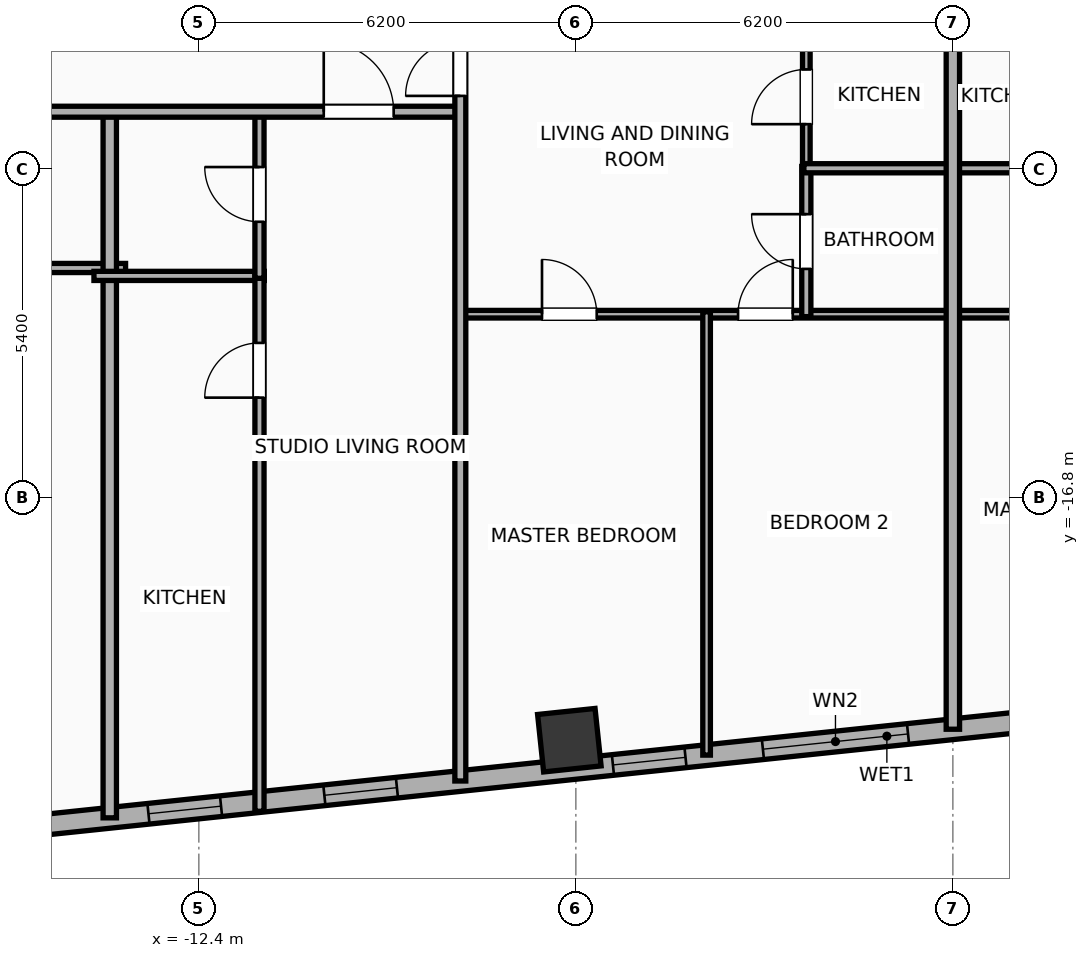
"""IFC4 building model, lengths in metres.
Left out: names, types, materials, properties, quantities, classifications, styles, units other than length and angle.
Written with IfcOpenShell. Run it as: python <this file> out.ifc"""

import sys

from ifc_helpers import new_model, si_unit, direction, frame, frame_2d, origin, origin_2d, place, context, subcontext, project, spatial, rectangle, hollow_rectangle, extrude, element, fill, save


model = new_model("IFC4")
c1 = context("Model", 3, precision=1e-05, world=origin(), true_north=direction((0.0, 1.0)))
c2 = subcontext(c1, "Body", "Model", "MODEL_VIEW")
j1 = project(units=[si_unit("LENGTHUNIT", "METRE"), si_unit("PLANEANGLEUNIT", "RADIAN")], contexts=[c1])
p1 = place(None, origin())
s1 = spatial("IfcSite", under=j1, at=p1, CompositionType="ELEMENT")
p2 = place(p1, origin())
s2 = spatial("IfcBuilding", under=s1, at=p2, CompositionType="ELEMENT")
p3 = place(p2, frame((0.0, 0.0, 159.9)))
s3 = spatial("IfcBuildingStorey", under=s2, at=p3, CompositionType="ELEMENT", Elevation=159.9)
p4 = place(p3, frame((-6.307, -20.785, 0.0), z_axis=(0.0, 0.0, 1.0), x_axis=(0.994521895368, 0.104528463268, 0.0)))
e1 = element("IfcColumn", 1, at=p4, inside=s3, PredefinedType="COLUMN", context=c2, shape_type="SweptSolid", body=[
    extrude(hollow_rectangle(XDim=0.95, YDim=0.95, WallThickness=0.032, at=origin_2d()), origin(), (0.0, 0.0, 1.0), 3.9),
])
p5 = place(p3, frame((24.756, -18.003, 0.0), z_axis=(0.0, 0.0, 1.0), x_axis=(-0.99452160744, -0.104531202687, 0.0)))
e2 = element("IfcWall", 2, at=p5, inside=s3, PredefinedType="ELEMENTEDWALL", context=c2, shape_type="SweptSolid", body=[
    extrude(rectangle(XDim=51.967, YDim=0.34, at=frame_2d((25.983, 0.0))), origin(), (0.0, 0.0, 1.0), 3.65),
])
p6 = place(p5, frame((25.633, 0.0, 0.75)))
e3 = element("IfcOpeningElement", 3, at=p6, cuts=e2, PredefinedType="OPENING", context=c2, shape_type="SweptSolid", body=[
    extrude(rectangle(XDim=2.4, YDim=2.1, at=frame_2d((1.2, 1.05))), frame((0.0, 0.18, 0.0), z_axis=(0.0, -1.0, 0.0), x_axis=(1.0, 0.0, 0.0)), (0.0, 0.0, 1.0), 0.36),
])
p7 = place(p5, frame((42.369, 0.0, 0.75)))
e4 = element("IfcOpeningElement", 4, at=p7, cuts=e2, PredefinedType="OPENING", context=c2, shape_type="SweptSolid", body=[
    extrude(rectangle(XDim=1.2, YDim=2.05, at=frame_2d((0.6, 1.025))), frame((0.0, 0.18, 0.0), z_axis=(0.0, -1.0, 0.0), x_axis=(1.0, 0.0, 0.0)), (0.0, 0.0, 1.0), 0.36),
])
p8 = place(p5, frame((34.085, 0.0, 0.75)))
e5 = element("IfcOpeningElement", 5, at=p8, cuts=e2, PredefinedType="OPENING", context=c2, shape_type="SweptSolid", body=[
    extrude(rectangle(XDim=1.2, YDim=2.05, at=frame_2d((0.6, 1.025))), frame((0.0, 0.18, 0.0), z_axis=(0.0, -1.0, 0.0), x_axis=(1.0, 0.0, 0.0)), (0.0, 0.0, 1.0), 0.36),
])
p9 = place(p5, frame((36.993, 0.0, 0.75)))
e6 = element("IfcOpeningElement", 6, at=p9, cuts=e2, PredefinedType="OPENING", context=c2, shape_type="SweptSolid", body=[
    extrude(rectangle(XDim=1.2, YDim=2.05, at=frame_2d((0.6, 1.025))), frame((0.0, 0.18, 0.0), z_axis=(0.0, -1.0, 0.0), x_axis=(1.0, 0.0, 0.0)), (0.0, 0.0, 1.0), 0.36),
])
p10 = place(p5, frame((14.397, 0.0, 0.75)))
e7 = element("IfcOpeningElement", 7, at=p10, cuts=e2, PredefinedType="OPENING", context=c2, shape_type="SweptSolid", body=[
    extrude(rectangle(XDim=1.2, YDim=2.05, at=frame_2d((0.6, 1.025))), frame((0.0, 0.18, 0.0), z_axis=(0.0, -1.0, 0.0), x_axis=(1.0, 0.0, 0.0)), (0.0, 0.0, 1.0), 0.36),
])
p11 = place(p5, frame((11.489, 0.0, 0.75)))
e8 = element("IfcOpeningElement", 8, at=p11, cuts=e2, PredefinedType="OPENING", context=c2, shape_type="SweptSolid", body=[
    extrude(rectangle(XDim=1.2, YDim=2.05, at=frame_2d((0.6, 1.025))), frame((0.0, 0.18, 0.0), z_axis=(0.0, -1.0, 0.0), x_axis=(1.0, 0.0, 0.0)), (0.0, 0.0, 1.0), 0.36),
])
p12 = place(p5, frame((8.521, 0.0, 0.75)))
e9 = element("IfcOpeningElement", 9, at=p12, cuts=e2, PredefinedType="OPENING", context=c2, shape_type="SweptSolid", body=[
    extrude(rectangle(XDim=1.2, YDim=2.05, at=frame_2d((0.6, 1.025))), frame((0.0, 0.18, 0.0), z_axis=(0.0, -1.0, 0.0), x_axis=(1.0, 0.0, 0.0)), (0.0, 0.0, 1.0), 0.36),
])
p13 = place(p5, frame((5.582, 0.0, 0.75)))
e10 = element("IfcOpeningElement", 10, at=p13, cuts=e2, PredefinedType="OPENING", context=c2, shape_type="SweptSolid", body=[
    extrude(rectangle(XDim=1.2, YDim=2.05, at=frame_2d((0.6, 1.025))), frame((0.0, 0.18, 0.0), z_axis=(0.0, -1.0, 0.0), x_axis=(1.0, 0.0, 0.0)), (0.0, 0.0, 1.0), 0.36),
])
p14 = place(p5, frame((29.313, 0.0, 0.75)))
e11 = element("IfcOpeningElement", 11, at=p14, cuts=e2, PredefinedType="OPENING", context=c2, shape_type="SweptSolid", body=[
    extrude(rectangle(XDim=1.2, YDim=2.05, at=frame_2d((0.6, 1.025))), frame((0.0, 0.18, 0.0), z_axis=(0.0, -1.0, 0.0), x_axis=(1.0, 0.0, 0.0)), (0.0, 0.0, 1.0), 0.36),
])
p15 = place(p5, frame((22.248, 0.0, 0.75)))
e12 = element("IfcOpeningElement", 12, at=p15, cuts=e2, PredefinedType="OPENING", context=c2, shape_type="SweptSolid", body=[
    extrude(rectangle(XDim=1.2, YDim=2.05, at=frame_2d((0.6, 1.025))), frame((0.0, 0.18, 0.0), z_axis=(0.0, -1.0, 0.0), x_axis=(1.0, 0.0, 0.0)), (0.0, 0.0, 1.0), 0.36),
])
p16 = place(p5, frame((18.186, 0.0, 0.75)))
e13 = element("IfcOpeningElement", 13, at=p16, cuts=e2, PredefinedType="OPENING", context=c2, shape_type="SweptSolid", body=[
    extrude(rectangle(XDim=1.2, YDim=2.05, at=frame_2d((0.6, 1.025))), frame((0.0, 0.18, 0.0), z_axis=(0.0, -1.0, 0.0), x_axis=(1.0, 0.0, 0.0)), (0.0, 0.0, 1.0), 0.36),
])
p17 = place(p5, frame((47.879, 0.0, 0.75)))
e14 = element("IfcOpeningElement", 14, at=p17, cuts=e2, PredefinedType="OPENING", context=c2, shape_type="SweptSolid", body=[
    extrude(rectangle(XDim=1.2, YDim=2.05, at=frame_2d((0.6, 1.025))), frame((0.0, 0.18, 0.0), z_axis=(0.0, -1.0, 0.0), x_axis=(1.0, 0.0, 0.0)), (0.0, 0.0, 1.0), 0.36),
])
p18 = place(p5, frame((49.844, 0.0, 0.75)))
e15 = element("IfcOpeningElement", 15, at=p18, cuts=e2, PredefinedType="OPENING", context=c2, shape_type="SweptSolid", body=[
    extrude(rectangle(XDim=1.2, YDim=2.05, at=frame_2d((0.6, 1.025))), frame((0.0, 0.18, 0.0), z_axis=(0.0, -1.0, 0.0), x_axis=(1.0, 0.0, 0.0)), (0.0, 0.0, 1.0), 0.36),
])
p19 = place(p3, frame((-15.932, -13.02, 0.0), z_axis=(0.0, 0.0, 1.0), x_axis=(1.0, 0.0, 0.0)))
e16 = element("IfcWall", 16, at=p19, inside=s3, PredefinedType="PLUMBINGWALL", context=c2, shape_type="SweptSolid", body=[
    extrude(rectangle(XDim=2.327, YDim=0.15, at=frame_2d((1.164, 0.0))), origin(), (0.0, 0.0, 1.0), 3.65),
])
p20 = place(p3, frame((-13.865, -22.062, 0.0), z_axis=(0.0, 0.0, 1.0), x_axis=(0.0, 1.0, 0.0)))
e17 = element("IfcWall", 17, at=p20, inside=s3, PredefinedType="PARTITIONING", context=c2, shape_type="SweptSolid", body=[
    extrude(rectangle(XDim=11.692, YDim=0.22, at=frame_2d((5.846, 0.0))), origin(), (0.0, 0.0, 1.0), 3.65),
])
p21 = place(p3, frame((-14.125, -13.15, 0.0), z_axis=(0.0, 0.0, 1.0), x_axis=(1.0, 0.0, 0.0)))
e18 = element("IfcWall", 18, at=p21, inside=s3, PredefinedType="PLUMBINGWALL", context=c2, shape_type="SweptSolid", body=[
    extrude(rectangle(XDim=2.802, YDim=0.15, at=frame_2d((1.401, 0.0))), origin(), (0.0, 0.0, 1.0), 3.65),
])
p22 = place(p3, frame((-11.403, -21.954, 0.0), z_axis=(0.0, 0.0, 1.0), x_axis=(0.0, 1.0, 0.0)))
e19 = element("IfcWall", 19, at=p22, inside=s3, PredefinedType="PLUMBINGWALL", context=c2, shape_type="SweptSolid", body=[
    extrude(rectangle(XDim=8.844, YDim=0.15, at=frame_2d((4.422, 0.0))), origin(), (0.0, 0.0, 1.0), 3.65),
])
p23 = place(p22, frame((6.802, 0.0, 0.0)))
e20 = element("IfcOpeningElement", 20, at=p23, cuts=e19, PredefinedType="OPENING", context=c2, shape_type="SweptSolid", body=[
    extrude(rectangle(XDim=0.9, YDim=2.05, at=frame_2d((0.45, 1.025))), frame((0.0, 0.085, 0.0), z_axis=(0.0, -1.0, 0.0), x_axis=(1.0, 0.0, 0.0)), (0.0, 0.0, 1.0), 0.17),
])
p24 = place(p3, frame((-11.403, -13.19, 0.0), z_axis=(0.0, 0.0, 1.0), x_axis=(0.0, 1.0, 0.0)))
e21 = element("IfcWall", 21, at=p24, inside=s3, PredefinedType="PLUMBINGWALL", context=c2, shape_type="SweptSolid", body=[
    extrude(rectangle(XDim=2.76, YDim=0.15, at=frame_2d((1.38, 0.0))), origin(), (0.0, 0.0, 1.0), 3.65),
])
p25 = place(p24, frame((0.93, 0.0, 0.0)))
e22 = element("IfcOpeningElement", 22, at=p25, cuts=e21, PredefinedType="OPENING", context=c2, shape_type="SweptSolid", body=[
    extrude(rectangle(XDim=0.9, YDim=2.05, at=frame_2d((0.45, 1.025))), frame((0.0, 0.085, 0.0), z_axis=(0.0, -1.0, 0.0), x_axis=(1.0, 0.0, 0.0)), (0.0, 0.0, 1.0), 0.17),
])
p26 = place(p3, frame((-19.75, -10.45, 0.0), z_axis=(0.0, 0.0, 1.0), x_axis=(1.0, 0.0, 0.0)))
e23 = element("IfcWall", 23, at=p26, inside=s3, PredefinedType="PARTITIONING", context=c2, shape_type="SweptSolid", body=[
    extrude(rectangle(XDim=11.67, YDim=0.18, at=frame_2d((5.835, 0.0))), origin(), (0.0, 0.0, 1.0), 3.65),
])
p27 = place(p26, frame((2.664, 0.0, 0.0)))
e24 = element("IfcOpeningElement", 24, at=p27, cuts=e23, PredefinedType="OPENING", context=c2, shape_type="SweptSolid", body=[
    extrude(rectangle(XDim=0.9, YDim=2.05, at=frame_2d((0.45, 1.025))), frame((0.0, 0.1, 0.0), z_axis=(0.0, -1.0, 0.0), x_axis=(1.0, 0.0, 0.0)), (0.0, 0.0, 1.0), 0.2),
])
p28 = place(p26, frame((9.404, 0.0, 0.0)))
e25 = element("IfcOpeningElement", 25, at=p28, cuts=e23, PredefinedType="OPENING", context=c2, shape_type="SweptSolid", body=[
    extrude(rectangle(XDim=1.15, YDim=2.05, at=frame_2d((0.575, 1.025))), frame((0.0, 0.1, 0.0), z_axis=(0.0, -1.0, 0.0), x_axis=(1.0, 0.0, 0.0)), (0.0, 0.0, 1.0), 0.2),
])
p29 = place(p3, frame((-8.08, -13.78, 0.0), z_axis=(0.0, 0.0, 1.0), x_axis=(1.0, 0.0, 0.0)))
e26 = element("IfcWall", 26, at=p29, inside=s3, PredefinedType="PARTITIONING", context=c2, shape_type="SweptSolid", body=[
    extrude(rectangle(XDim=8.06, YDim=0.125, at=frame_2d((4.03, 0.0))), origin(), (0.0, 0.0, 1.0), 3.65),
])
p30 = place(p29, frame((1.323, 0.0, 0.0)))
e27 = element("IfcOpeningElement", 27, at=p30, cuts=e26, PredefinedType="OPENING", context=c2, shape_type="SweptSolid", body=[
    extrude(rectangle(XDim=0.9, YDim=2.05, at=frame_2d((0.45, 1.025))), frame((0.0, 0.073, 0.0), z_axis=(0.0, -1.0, 0.0), x_axis=(1.0, 0.0, 0.0)), (0.0, 0.0, 1.0), 0.145),
])
p31 = place(p29, frame((4.547, 0.0, 0.0)))
e28 = element("IfcOpeningElement", 28, at=p31, cuts=e26, PredefinedType="OPENING", context=c2, shape_type="SweptSolid", body=[
    extrude(rectangle(XDim=0.9, YDim=2.05, at=frame_2d((0.45, 1.025))), frame((0.0, 0.073, 0.0), z_axis=(0.0, -1.0, 0.0), x_axis=(1.0, 0.0, 0.0)), (0.0, 0.0, 1.0), 0.145),
])
p32 = place(p3, frame((-2.41, -11.41, 0.0), z_axis=(0.0, 0.0, 1.0), x_axis=(0.0, 1.0, 0.0)))
e29 = element("IfcWall", 29, at=p32, inside=s3, PredefinedType="PARTITIONING", context=c2, shape_type="SweptSolid", body=[
    extrude(rectangle(XDim=2.41, YDim=0.125, at=frame_2d((1.205, 0.0))), origin(), (0.0, 0.0, 1.0), 3.65),
])
p33 = place(p32, frame((0.755, 0.0, 0.0)))
e30 = element("IfcOpeningElement", 30, at=p33, cuts=e29, PredefinedType="OPENING", context=c2, shape_type="SweptSolid", body=[
    extrude(rectangle(XDim=0.9, YDim=2.05, at=frame_2d((0.45, 1.025))), frame((0.0, 0.073, 0.0), z_axis=(0.0, -1.0, 0.0), x_axis=(1.0, 0.0, 0.0)), (0.0, 0.0, 1.0), 0.145),
])
p34 = place(p3, frame((-2.41, -13.82, 0.0), z_axis=(0.0, 0.0, 1.0), x_axis=(0.0, 1.0, 0.0)))
e31 = element("IfcWall", 31, at=p34, inside=s3, PredefinedType="PLUMBINGWALL", context=c2, shape_type="SweptSolid", body=[
    extrude(rectangle(XDim=2.47, YDim=0.15, at=frame_2d((1.235, 0.0))), origin(), (0.0, 0.0, 1.0), 3.65),
])
p35 = place(p34, frame((0.785, 0.0, 0.0)))
e32 = element("IfcOpeningElement", 32, at=p35, cuts=e31, PredefinedType="OPENING", context=c2, shape_type="SweptSolid", body=[
    extrude(rectangle(XDim=0.9, YDim=2.05, at=frame_2d((0.45, 1.025))), frame((0.0, 0.085, 0.0), z_axis=(0.0, -1.0, 0.0), x_axis=(1.0, 0.0, 0.0)), (0.0, 0.0, 1.0), 0.17),
])
p36 = place(p3, frame((-2.45, -11.38, 0.0), z_axis=(0.0, 0.0, 1.0), x_axis=(1.0, 0.0, 0.0)))
e33 = element("IfcWall", 33, at=p36, inside=s3, PredefinedType="PLUMBINGWALL", context=c2, shape_type="SweptSolid", body=[
    extrude(rectangle(XDim=2.43, YDim=0.15, at=frame_2d((1.215, 0.0))), origin(), (0.0, 0.0, 1.0), 3.65),
])
p37 = place(p3, frame((-4.05, -21.031, 0.0), z_axis=(0.0, 0.0, 1.0), x_axis=(0.0, 1.0, 0.0)))
e34 = element("IfcWall", 34, at=p37, inside=s3, PredefinedType="PARTITIONING", context=c2, shape_type="SweptSolid", body=[
    extrude(rectangle(XDim=7.291, YDim=0.125, at=frame_2d((3.646, 0.0))), origin(), (0.0, 0.0, 1.0), 3.65),
])
p38 = place(p3, frame((-8.1, -21.456, 0.0), z_axis=(0.0, 0.0, 1.0), x_axis=(0.0, 1.0, 0.0)))
e35 = element("IfcWall", 35, at=p38, inside=s3, PredefinedType="PARTITIONING", context=c2, shape_type="SweptSolid", body=[
    extrude(rectangle(XDim=12.516, YDim=0.18, at=frame_2d((6.258, 0.0))), origin(), (0.0, 0.0, 1.0), 3.65),
])
p39 = place(p38, frame((11.267, 0.0, 0.0)))
e36 = element("IfcOpeningElement", 36, at=p39, cuts=e35, PredefinedType="OPENING", context=c2, shape_type="SweptSolid", body=[
    extrude(rectangle(XDim=0.9, YDim=2.05, at=frame_2d((0.45, 1.025))), frame((0.0, 0.1, 0.0), z_axis=(0.0, -1.0, 0.0), x_axis=(1.0, 0.0, 0.0)), (0.0, 0.0, 1.0), 0.2),
])
p40 = place(p3, frame((0.02, -13.78, 0.0), z_axis=(0.0, 0.0, 1.0), x_axis=(1.0, 0.0, 0.0)))
e37 = element("IfcWall", 37, at=p40, inside=s3, PredefinedType="PARTITIONING", context=c2, shape_type="SweptSolid", body=[
    extrude(rectangle(XDim=8.06, YDim=0.125, at=frame_2d((4.03, 0.0))), origin(), (0.0, 0.0, 1.0), 3.65),
])
p41 = place(p40, frame((1.323, 0.0, 0.0)))
e38 = element("IfcOpeningElement", 38, at=p41, cuts=e37, PredefinedType="OPENING", context=c2, shape_type="SweptSolid", body=[
    extrude(rectangle(XDim=0.9, YDim=2.05, at=frame_2d((0.45, 1.025))), frame((0.0, 0.073, 0.0), z_axis=(0.0, -1.0, 0.0), x_axis=(1.0, 0.0, 0.0)), (0.0, 0.0, 1.0), 0.145),
])
p42 = place(p40, frame((5.837, 0.0, 0.0)))
e39 = element("IfcOpeningElement", 39, at=p42, cuts=e37, PredefinedType="OPENING", context=c2, shape_type="SweptSolid", body=[
    extrude(rectangle(XDim=0.9, YDim=2.05, at=frame_2d((0.45, 1.025))), frame((0.0, 0.073, 0.0), z_axis=(0.0, -1.0, 0.0), x_axis=(1.0, 0.0, 0.0)), (0.0, 0.0, 1.0), 0.145),
])
p43 = place(p3, frame((0.02, -11.38, 0.0), z_axis=(0.0, 0.0, 1.0), x_axis=(1.0, 0.0, 0.0)))
e40 = element("IfcWall", 40, at=p43, inside=s3, PredefinedType="PLUMBINGWALL", context=c2, shape_type="SweptSolid", body=[
    extrude(rectangle(XDim=2.43, YDim=0.15, at=frame_2d((1.215, 0.0))), origin(), (0.0, 0.0, 1.0), 3.65),
])
p44 = place(p3, frame((0.0, -20.605, 0.0), z_axis=(0.0, 0.0, 1.0), x_axis=(0.0, 1.0, 0.0)))
e41 = element("IfcWall", 41, at=p44, inside=s3, PredefinedType="PARTITIONING", context=c2, shape_type="SweptSolid", body=[
    extrude(rectangle(XDim=11.665, YDim=0.22, at=frame_2d((5.833, 0.0))), origin(), (0.0, 0.0, 1.0), 3.65),
])
p45 = place(p6, origin())
e42 = element("IfcWindow", 42, at=p45, inside=s3, PartitioningType="SINGLE_PANEL", PredefinedType="WINDOW", context=c2, shape_type="SweptSolid", body=[
    extrude(rectangle(XDim=2.4, YDim=2.1, at=frame_2d((1.2, 1.05))), frame((0.0, 0.03, 0.0), z_axis=(0.0, -1.0, 0.0), x_axis=(1.0, 0.0, 0.0)), (0.0, 0.0, 1.0), 0.06),
])
fill(e3, e42)
p46 = place(p8, origin())
e43 = element("IfcWindow", 43, at=p46, inside=s3, PartitioningType="SINGLE_PANEL", PredefinedType="WINDOW", context=c2, shape_type="SweptSolid", body=[
    extrude(rectangle(XDim=1.2, YDim=2.05, at=frame_2d((0.6, 1.025))), frame((0.0, 0.03, 0.0), z_axis=(0.0, -1.0, 0.0), x_axis=(1.0, 0.0, 0.0)), (0.0, 0.0, 1.0), 0.06),
])
fill(e5, e43)
p47 = place(p9, origin())
e44 = element("IfcWindow", 44, at=p47, inside=s3, PartitioningType="SINGLE_PANEL", PredefinedType="WINDOW", context=c2, shape_type="SweptSolid", body=[
    extrude(rectangle(XDim=1.2, YDim=2.05, at=frame_2d((0.6, 1.025))), frame((0.0, 0.03, 0.0), z_axis=(0.0, -1.0, 0.0), x_axis=(1.0, 0.0, 0.0)), (0.0, 0.0, 1.0), 0.06),
])
fill(e6, e44)
p48 = place(p14, origin())
e45 = element("IfcWindow", 45, at=p48, inside=s3, PartitioningType="SINGLE_PANEL", PredefinedType="WINDOW", context=c2, shape_type="SweptSolid", body=[
    extrude(rectangle(XDim=1.2, YDim=2.05, at=frame_2d((0.6, 1.025))), frame((0.0, 0.03, 0.0), z_axis=(0.0, -1.0, 0.0), x_axis=(1.0, 0.0, 0.0)), (0.0, 0.0, 1.0), 0.06),
])
fill(e11, e45)
p49 = place(p23, origin())
e46 = element("IfcDoor", 46, at=p49, inside=s3, OperationType="SINGLE_SWING_LEFT", PredefinedType="DOOR", context=c2, shape_type="SweptSolid", body=[
    extrude(rectangle(XDim=0.9, YDim=2.05, at=frame_2d((0.45, 1.025))), frame((0.0, 0.025, 0.0), z_axis=(0.0, -1.0, 0.0), x_axis=(1.0, 0.0, 0.0)), (0.0, 0.0, 1.0), 0.05),
])
fill(e20, e46)
p50 = place(p25, origin())
e47 = element("IfcDoor", 47, at=p50, inside=s3, OperationType="SINGLE_SWING_RIGHT", PredefinedType="DOOR", context=c2, shape_type="SweptSolid", body=[
    extrude(rectangle(XDim=0.9, YDim=2.05, at=frame_2d((0.45, 1.025))), frame((0.0, 0.025, 0.0), z_axis=(0.0, -1.0, 0.0), x_axis=(1.0, 0.0, 0.0)), (0.0, 0.0, 1.0), 0.05),
])
fill(e22, e47)
p51 = place(p28, origin())
e48 = element("IfcDoor", 48, at=p51, inside=s3, OperationType="SINGLE_SWING_LEFT", PredefinedType="DOOR", context=c2, shape_type="SweptSolid", body=[
    extrude(rectangle(XDim=1.15, YDim=2.05, at=frame_2d((0.575, 1.025))), frame((0.0, 0.025, 0.0), z_axis=(0.0, -1.0, 0.0), x_axis=(1.0, 0.0, 0.0)), (0.0, 0.0, 1.0), 0.05),
])
fill(e25, e48)
p52 = place(p30, origin())
e49 = element("IfcDoor", 49, at=p52, inside=s3, OperationType="SINGLE_SWING_LEFT", PredefinedType="DOOR", context=c2, shape_type="SweptSolid", body=[
    extrude(rectangle(XDim=0.9, YDim=2.05, at=frame_2d((0.45, 1.025))), frame((0.0, 0.025, 0.0), z_axis=(0.0, -1.0, 0.0), x_axis=(1.0, 0.0, 0.0)), (0.0, 0.0, 1.0), 0.05),
])
fill(e27, e49)
p53 = place(p31, origin())
e50 = element("IfcDoor", 50, at=p53, inside=s3, OperationType="SINGLE_SWING_RIGHT", PredefinedType="DOOR", context=c2, shape_type="SweptSolid", body=[
    extrude(rectangle(XDim=0.9, YDim=2.05, at=frame_2d((0.45, 1.025))), frame((0.0, 0.025, 0.0), z_axis=(0.0, -1.0, 0.0), x_axis=(1.0, 0.0, 0.0)), (0.0, 0.0, 1.0), 0.05),
])
fill(e28, e50)
p54 = place(p33, origin())
e51 = element("IfcDoor", 51, at=p54, inside=s3, OperationType="SINGLE_SWING_LEFT", PredefinedType="DOOR", context=c2, shape_type="SweptSolid", body=[
    extrude(rectangle(XDim=0.9, YDim=2.05, at=frame_2d((0.45, 1.025))), frame((0.0, 0.025, 0.0), z_axis=(0.0, -1.0, 0.0), x_axis=(1.0, 0.0, 0.0)), (0.0, 0.0, 1.0), 0.05),
])
fill(e30, e51)
p55 = place(p35, origin())
e52 = element("IfcDoor", 52, at=p55, inside=s3, OperationType="SINGLE_SWING_RIGHT", PredefinedType="DOOR", context=c2, shape_type="SweptSolid", body=[
    extrude(rectangle(XDim=0.9, YDim=2.05, at=frame_2d((0.45, 1.025))), frame((0.0, 0.025, 0.0), z_axis=(0.0, -1.0, 0.0), x_axis=(1.0, 0.0, 0.0)), (0.0, 0.0, 1.0), 0.05),
])
fill(e32, e52)
p56 = place(p39, origin())
e53 = element("IfcDoor", 53, at=p56, inside=s3, OperationType="SINGLE_SWING_LEFT", PredefinedType="DOOR", context=c2, shape_type="SweptSolid", body=[
    extrude(rectangle(XDim=0.9, YDim=2.05, at=frame_2d((0.45, 1.025))), frame((0.0, 0.025, 0.0), z_axis=(0.0, -1.0, 0.0), x_axis=(1.0, 0.0, 0.0)), (0.0, 0.0, 1.0), 0.05),
])
fill(e36, e53)
save(model, sys.argv[1])
